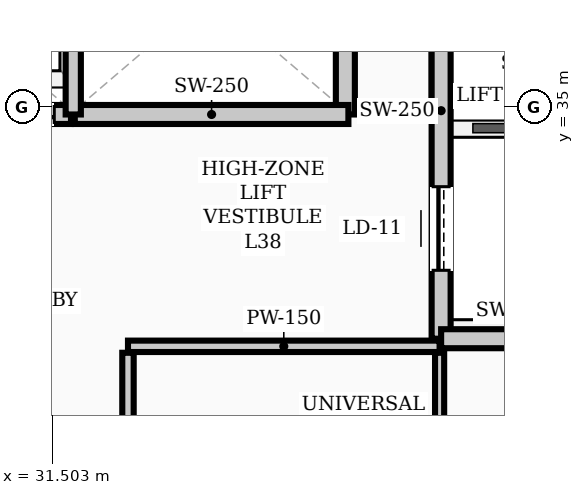
"""IFC4 building model, lengths in metres.
Left out: names, types, materials, properties, quantities, classifications, styles, units other than length and angle.
Written with IfcOpenShell. Run it as: python <this file> out.ifc"""

import sys

from ifc_helpers import new_model, si_unit, direction, frame, frame_2d, origin, place, context, subcontext, project, spatial, rectangle, extrude, element, fill, save


model = new_model("IFC4")
c1 = context("Model", 3, precision=1e-05, world=origin(), true_north=direction((0.0, 1.0)))
c2 = subcontext(c1, "Body", "Model", "MODEL_VIEW")
j1 = project(units=[si_unit("LENGTHUNIT", "METRE"), si_unit("PLANEANGLEUNIT", "RADIAN")], contexts=[c1])
p1 = place(None, origin())
s1 = spatial("IfcSite", under=j1, at=p1, CompositionType="ELEMENT")
p2 = place(p1, origin())
s2 = spatial("IfcBuilding", under=s1, at=p2, CompositionType="ELEMENT")
p3 = place(p2, frame((0.0, 0.0, 153.9)))
s3 = spatial("IfcBuildingStorey", under=s2, at=p3, CompositionType="ELEMENT", Elevation=153.9)
p4 = place(p3, frame((36.62, 31.95, 0.0), z_axis=(0.0, 0.0, 1.0), x_axis=(0.0, 1.0, 0.0)))
e1 = element("IfcWall", 1, at=p4, inside=s3, PredefinedType="STANDARD", context=c2, shape_type="SweptSolid", body=[
    extrude(rectangle(XDim=6.0, YDim=0.25, at=frame_2d((3.0, 0.0))), origin(), (0.0, 0.0, 1.0), 3.35),
])
p5 = place(p4, frame((0.9, 0.0, 0.0)))
e2 = element("IfcOpeningElement", 2, at=p5, cuts=e1, PredefinedType="OPENING", context=c2, shape_type="SweptSolid", body=[
    extrude(rectangle(XDim=1.1, YDim=2.08, at=frame_2d((0.55, 1.04))), frame((0.0, 0.135, 0.0), z_axis=(0.0, -1.0, 0.0), x_axis=(1.0, 0.0, 0.0)), (0.0, 0.0, 1.0), 0.27),
])
p6 = place(p4, frame((4.0, 0.0, 0.0)))
e3 = element("IfcOpeningElement", 3, at=p6, cuts=e1, PredefinedType="OPENING", context=c2, shape_type="SweptSolid", body=[
    extrude(rectangle(XDim=1.1, YDim=2.08, at=frame_2d((0.55, 1.04))), frame((0.0, 0.135, 0.0), z_axis=(0.0, -1.0, 0.0), x_axis=(1.0, 0.0, 0.0)), (0.0, 0.0, 1.0), 0.27),
])
p7 = place(p3, frame((36.62, 31.95, 0.0), z_axis=(0.0, 0.0, 1.0), x_axis=(1.0, 0.0, 0.0)))
e4 = element("IfcWall", 4, at=p7, inside=s3, PredefinedType="STANDARD", context=c2, shape_type="SweptSolid", body=[
    extrude(rectangle(XDim=1.9, YDim=0.25, at=frame_2d((0.95, 0.0))), origin(), (0.0, 0.0, 1.0), 3.48),
])
p8 = place(p3, frame((35.36, 34.9, 0.0), z_axis=(0.0, 0.0, 1.0), x_axis=(0.0, 1.0, 0.0)))
e5 = element("IfcWall", 5, at=p8, inside=s3, PredefinedType="STANDARD", context=c2, shape_type="SweptSolid", body=[
    extrude(rectangle(XDim=3.05, YDim=0.25, at=frame_2d((1.525, 0.0))), origin(), (0.0, 0.0, 1.0), 3.35),
])
p9 = place(p3, frame((28.2, 34.9, 0.0), z_axis=(0.0, 0.0, 1.0), x_axis=(1.0, 0.0, 0.0)))
e6 = element("IfcWall", 6, at=p9, inside=s3, PredefinedType="STANDARD", context=c2, shape_type="SweptSolid", body=[
    extrude(rectangle(XDim=3.55, YDim=0.25, at=frame_2d((1.775, 0.0))), origin(), (0.0, 0.0, 1.0), 3.72),
])
p10 = place(p9, frame((0.23, 0.0, 0.0)))
e7 = element("IfcOpeningElement", 7, at=p10, cuts=e6, PredefinedType="OPENING", context=c2, shape_type="SweptSolid", body=[
    extrude(rectangle(XDim=1.3, YDim=2.08, at=frame_2d((0.65, 1.04))), frame((0.0, 0.135, 0.0), z_axis=(0.0, -1.0, 0.0), x_axis=(1.0, 0.0, 0.0)), (0.0, 0.0, 1.0), 0.27),
])
p11 = place(p9, frame((2.03, 0.0, 0.0)))
e8 = element("IfcOpeningElement", 8, at=p11, cuts=e6, PredefinedType="OPENING", context=c2, shape_type="SweptSolid", body=[
    extrude(rectangle(XDim=1.3, YDim=2.08, at=frame_2d((0.65, 1.04))), frame((0.0, 0.135, 0.0), z_axis=(0.0, -1.0, 0.0), x_axis=(1.0, 0.0, 0.0)), (0.0, 0.0, 1.0), 0.27),
])
p12 = place(p3, frame((31.8, 34.9, 0.0), z_axis=(0.0, 0.0, 1.0), x_axis=(1.0, 0.0, 0.0)))
e9 = element("IfcWall", 9, at=p12, inside=s3, PredefinedType="STANDARD", context=c2, shape_type="SweptSolid", body=[
    extrude(rectangle(XDim=3.6, YDim=0.25, at=frame_2d((1.8, 0.0))), origin(), (0.0, 0.0, 1.0), 3.72),
])
p13 = place(p3, frame((32.5, 31.85, 0.0), z_axis=(0.0, 0.0, 1.0), x_axis=(1.0, 0.0, 0.0)))
e10 = element("IfcWall", 10, at=p13, inside=s3, PredefinedType="PARTITIONING", context=c2, shape_type="SweptSolid", body=[
    extrude(rectangle(XDim=4.1, YDim=0.15, at=frame_2d((2.05, 0.0))), origin(), (0.0, 0.0, 1.0), 3.72),
])
p14 = place(p3, frame((32.5, 29.285, 0.0), z_axis=(0.0, 0.0, 1.0), x_axis=(0.0, 1.0, 0.0)))
e11 = element("IfcWall", 11, at=p14, inside=s3, PredefinedType="PARTITIONING", context=c2, shape_type="SweptSolid", body=[
    extrude(rectangle(XDim=2.48, YDim=0.15, at=frame_2d((1.24, 0.0))), origin(), (0.0, 0.0, 1.0), 3.35),
])
p15 = place(p3, frame((36.6, 29.285, 0.0), z_axis=(0.0, 0.0, 1.0), x_axis=(0.0, 1.0, 0.0)))
e12 = element("IfcWall", 12, at=p15, inside=s3, PredefinedType="PARTITIONING", context=c2, shape_type="SweptSolid", body=[
    extrude(rectangle(XDim=2.48, YDim=0.12, at=frame_2d((1.24, 0.0))), origin(), (0.0, 0.0, 1.0), 3.35),
])
p16 = place(p3, frame((31.78, 34.9, 0.0), z_axis=(0.0, 0.0, 1.0), x_axis=(0.0, 1.0, 0.0)))
e13 = element("IfcWall", 13, at=p16, inside=s3, PredefinedType="STANDARD", context=c2, shape_type="SweptSolid", body=[
    extrude(rectangle(XDim=3.12, YDim=0.2, at=frame_2d((1.56, 0.0))), origin(), (0.0, 0.0, 1.0), 3.35),
])
p17 = place(p5, origin())
e14 = element("IfcDoor", 14, at=p17, inside=s3, OperationType="SLIDING_TO_LEFT", PredefinedType="DOOR", context=c2, shape_type="SweptSolid", body=[
    extrude(rectangle(XDim=1.1, YDim=2.08, at=frame_2d((0.55, 1.04))), frame((0.0, 0.025, 0.0), z_axis=(0.0, -1.0, 0.0), x_axis=(1.0, 0.0, 0.0)), (0.0, 0.0, 1.0), 0.05),
])
fill(e2, e14)
p18 = place(p11, origin())
e15 = element("IfcDoor", 15, at=p18, inside=s3, OperationType="DOUBLE_DOOR_SLIDING", PredefinedType="DOOR", context=c2, shape_type="SweptSolid", body=[
    extrude(rectangle(XDim=1.3, YDim=2.08, at=frame_2d((0.65, 1.04))), frame((0.0, 0.025, 0.0), z_axis=(0.0, -1.0, 0.0), x_axis=(1.0, 0.0, 0.0)), (0.0, 0.0, 1.0), 0.05),
])
fill(e8, e15)
save(model, sys.argv[1])
